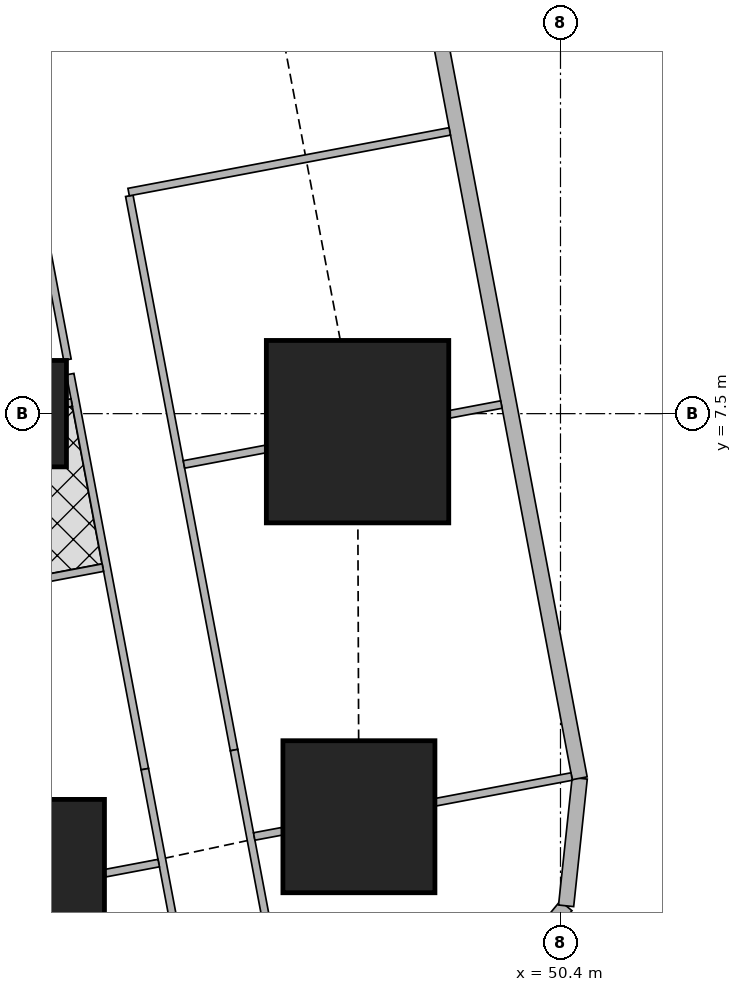
"""IFC4 building model, lengths in metres.
Left out: names, types, materials, properties, quantities, classifications, styles, units other than length and angle.
Written with IfcOpenShell. Run it as: python <this file> out.ifc"""

import sys

from ifc_helpers import new_model, si_unit, direction, frame, frame_2d, origin, origin_2d, place, context, subcontext, project, spatial, rectangle, extrude, element, fill, save


model = new_model("IFC4")
c1 = context("Model", 3, precision=1e-05, world=origin(), true_north=direction((0.0, 1.0)))
c2 = subcontext(c1, "Body", "Model", "MODEL_VIEW")
j1 = project(units=[si_unit("LENGTHUNIT", "METRE"), si_unit("PLANEANGLEUNIT", "RADIAN")], contexts=[c1])
p1 = place(None, origin())
s1 = spatial("IfcSite", under=j1, at=p1, CompositionType="ELEMENT")
p2 = place(p1, origin())
s2 = spatial("IfcBuilding", under=s1, at=p2, CompositionType="ELEMENT")
p3 = place(p2, frame((0.0, 0.0, 216.2)))
s3 = spatial("IfcBuildingStorey", under=s2, at=p3, CompositionType="ELEMENT", Elevation=216.2)
p4 = place(p3, frame((43.2, 1.225, 0.0), z_axis=(0.0, 0.0, 1.0), x_axis=(1.0, 0.0, 0.0)))
e1 = element("IfcColumn", 1, at=p4, inside=s3, PredefinedType="COLUMN", context=c2, shape_type="SweptSolid", body=[
    extrude(rectangle(XDim=2.4, YDim=2.4, at=origin_2d()), origin(), (0.0, 0.0, 1.0), 3.75),
])
p5 = place(p3, frame((47.748, 2.197, 0.0), z_axis=(0.0, 0.0, 1.0), x_axis=(1.0, 0.0, 0.0)))
e2 = element("IfcColumn", 2, at=p5, inside=s3, PredefinedType="COLUMN", context=c2, shape_type="SweptSolid", body=[
    extrude(rectangle(XDim=2.0, YDim=2.0, at=origin_2d()), origin(), (0.0, 0.0, 1.0), 3.75),
])
p6 = place(p3, frame((43.2, 7.5, 0.0), z_axis=(0.0, 0.0, 1.0), x_axis=(1.0, 0.0, 0.0)))
e3 = element("IfcColumn", 3, at=p6, inside=s3, PredefinedType="COLUMN", context=c2, shape_type="SweptSolid", body=[
    extrude(rectangle(XDim=1.4, YDim=1.4, at=origin_2d()), origin(), (0.0, 0.0, 1.0), 3.75),
])
p7 = place(p3, frame((47.73, 7.263, 0.0), z_axis=(0.0, 0.0, 1.0), x_axis=(1.0, 0.0, 0.0)))
e4 = element("IfcColumn", 4, at=p7, inside=s3, PredefinedType="COLUMN", context=c2, shape_type="SweptSolid", body=[
    extrude(rectangle(XDim=2.4, YDim=2.4, at=origin_2d()), origin(), (0.0, 0.0, 1.0), 3.75),
])
p8 = place(p3, frame((49.407, -0.263, 0.0), z_axis=(0.0, 0.0, 1.0), x_axis=(0.638042593423, 0.770001070764, 0.0)))
e5 = element("IfcWall", 5, at=p8, inside=s3, PredefinedType="SOLIDWALL", context=c2, shape_type="SweptSolid", body=[
    extrude(rectangle(XDim=1.673, YDim=0.2, at=frame_2d((0.836, 0.0))), origin(), (0.0, 0.0, 1.0), 3.5),
])
p9 = place(p3, frame((50.474, 1.025, 0.0), z_axis=(0.0, 0.0, 1.0), x_axis=(0.106047815515, 0.994361031429, 0.0)))
e6 = element("IfcWall", 6, at=p9, inside=s3, PredefinedType="SOLIDWALL", context=c2, shape_type="SweptSolid", body=[
    extrude(rectangle(XDim=1.688, YDim=0.2, at=frame_2d((0.844, 0.0))), origin(), (0.0, 0.0, 1.0), 3.5),
])
p10 = place(p3, frame((50.653, 2.703, 0.0), z_axis=(0.0, 0.0, 1.0), x_axis=(-0.185612026696, 0.982623109613, 0.0)))
e7 = element("IfcWall", 7, at=p10, inside=s3, PredefinedType="SOLIDWALL", context=c2, shape_type="SweptSolid", body=[
    extrude(rectangle(XDim=41.393, YDim=0.2, at=frame_2d((20.697, 0.0))), origin(), (0.0, 0.0, 1.0), 3.5),
])
p11 = place(p10, frame((1.633, 0.0, 0.9)))
e8 = element("IfcOpeningElement", 8, at=p11, cuts=e7, PredefinedType="OPENING", context=c2, shape_type="SweptSolid", body=[
    extrude(rectangle(XDim=1.8, YDim=1.5, at=frame_2d((0.9, 0.75))), frame((0.0, 0.11, 0.0), z_axis=(0.0, -1.0, 0.0), x_axis=(1.0, 0.0, 0.0)), (0.0, 0.0, 1.0), 0.22),
])
p12 = place(p10, frame((6.032, 0.0, 0.9)))
e9 = element("IfcOpeningElement", 9, at=p12, cuts=e7, PredefinedType="OPENING", context=c2, shape_type="SweptSolid", body=[
    extrude(rectangle(XDim=1.8, YDim=1.5, at=frame_2d((0.9, 0.75))), frame((0.0, 0.11, 0.0), z_axis=(0.0, -1.0, 0.0), x_axis=(1.0, 0.0, 0.0)), (0.0, 0.0, 1.0), 0.22),
])
p13 = place(p10, frame((9.848, 0.0, 0.9)))
e10 = element("IfcOpeningElement", 10, at=p13, cuts=e7, PredefinedType="OPENING", context=c2, shape_type="SweptSolid", body=[
    extrude(rectangle(XDim=1.8, YDim=1.5, at=frame_2d((0.9, 0.75))), frame((0.0, 0.11, 0.0), z_axis=(0.0, -1.0, 0.0), x_axis=(1.0, 0.0, 0.0)), (0.0, 0.0, 1.0), 0.22),
])
p14 = place(p10, frame((13.664, 0.0, 0.9)))
e11 = element("IfcOpeningElement", 11, at=p14, cuts=e7, PredefinedType="OPENING", context=c2, shape_type="SweptSolid", body=[
    extrude(rectangle(XDim=1.8, YDim=1.5, at=frame_2d((0.9, 0.75))), frame((0.0, 0.11, 0.0), z_axis=(0.0, -1.0, 0.0), x_axis=(1.0, 0.0, 0.0)), (0.0, 0.0, 1.0), 0.22),
])
p15 = place(p10, frame((17.481, 0.0, 0.9)))
e12 = element("IfcOpeningElement", 12, at=p15, cuts=e7, PredefinedType="OPENING", context=c2, shape_type="SweptSolid", body=[
    extrude(rectangle(XDim=1.8, YDim=1.5, at=frame_2d((0.9, 0.75))), frame((0.0, 0.11, 0.0), z_axis=(0.0, -1.0, 0.0), x_axis=(1.0, 0.0, 0.0)), (0.0, 0.0, 1.0), 0.22),
])
p16 = place(p10, frame((21.297, 0.0, 0.9)))
e13 = element("IfcOpeningElement", 13, at=p16, cuts=e7, PredefinedType="OPENING", context=c2, shape_type="SweptSolid", body=[
    extrude(rectangle(XDim=1.8, YDim=1.5, at=frame_2d((0.9, 0.75))), frame((0.0, 0.11, 0.0), z_axis=(0.0, -1.0, 0.0), x_axis=(1.0, 0.0, 0.0)), (0.0, 0.0, 1.0), 0.22),
])
p17 = place(p10, frame((25.113, 0.0, 0.9)))
e14 = element("IfcOpeningElement", 14, at=p17, cuts=e7, PredefinedType="OPENING", context=c2, shape_type="SweptSolid", body=[
    extrude(rectangle(XDim=1.8, YDim=1.5, at=frame_2d((0.9, 0.75))), frame((0.0, 0.11, 0.0), z_axis=(0.0, -1.0, 0.0), x_axis=(1.0, 0.0, 0.0)), (0.0, 0.0, 1.0), 0.22),
])
p18 = place(p10, frame((28.93, 0.0, 0.9)))
e15 = element("IfcOpeningElement", 15, at=p18, cuts=e7, PredefinedType="OPENING", context=c2, shape_type="SweptSolid", body=[
    extrude(rectangle(XDim=1.8, YDim=1.5, at=frame_2d((0.9, 0.75))), frame((0.0, 0.11, 0.0), z_axis=(0.0, -1.0, 0.0), x_axis=(1.0, 0.0, 0.0)), (0.0, 0.0, 1.0), 0.22),
])
p19 = place(p10, frame((32.746, 0.0, 0.9)))
e16 = element("IfcOpeningElement", 16, at=p19, cuts=e7, PredefinedType="OPENING", context=c2, shape_type="SweptSolid", body=[
    extrude(rectangle(XDim=1.8, YDim=1.5, at=frame_2d((0.9, 0.75))), frame((0.0, 0.11, 0.0), z_axis=(0.0, -1.0, 0.0), x_axis=(1.0, 0.0, 0.0)), (0.0, 0.0, 1.0), 0.22),
])
p20 = place(p10, frame((36.481, 0.0, 0.9)))
e17 = element("IfcOpeningElement", 17, at=p20, cuts=e7, PredefinedType="OPENING", context=c2, shape_type="SweptSolid", body=[
    extrude(rectangle(XDim=1.8, YDim=1.5, at=frame_2d((0.9, 0.75))), frame((0.0, 0.11, 0.0), z_axis=(0.0, -1.0, 0.0), x_axis=(1.0, 0.0, 0.0)), (0.0, 0.0, 1.0), 0.22),
])
p21 = place(p3, frame((44.727, 10.366, 0.0), z_axis=(0.0, 0.0, 1.0), x_axis=(0.185678775129, -0.982610498858, 0.0)))
e18 = element("IfcWall", 18, at=p21, inside=s3, PredefinedType="PARTITIONING", context=c2, shape_type="SweptSolid", body=[
    extrude(rectangle(XDim=7.421, YDim=0.1, at=frame_2d((3.71, 0.0))), origin(), (0.0, 0.0, 1.0), 3.5),
])
p22 = place(p21, frame((0.151, 0.0, 0.0)))
e19 = element("IfcOpeningElement", 19, at=p22, cuts=e18, PredefinedType="OPENING", context=c2, shape_type="SweptSolid", body=[
    extrude(rectangle(XDim=0.9, YDim=2.1, at=frame_2d((0.45, 1.05))), frame((0.0, 0.06, 0.0), z_axis=(0.0, -1.0, 0.0), x_axis=(1.0, 0.0, 0.0)), (0.0, 0.0, 1.0), 0.12),
])
p23 = place(p21, frame((4.65, 0.0, 0.0)))
e20 = element("IfcOpeningElement", 20, at=p23, cuts=e18, PredefinedType="OPENING", context=c2, shape_type="SweptSolid", body=[
    extrude(rectangle(XDim=0.9, YDim=2.1, at=frame_2d((0.45, 1.05))), frame((0.0, 0.06, 0.0), z_axis=(0.0, -1.0, 0.0), x_axis=(1.0, 0.0, 0.0)), (0.0, 0.0, 1.0), 0.12),
])
p24 = place(p3, frame((46.105, 3.074, 0.0), z_axis=(0.0, 0.0, 1.0), x_axis=(0.185631845838, -0.982619365681, 0.0)))
e21 = element("IfcWall", 21, at=p24, inside=s3, PredefinedType="PARTITIONING", context=c2, shape_type="SweptSolid", body=[
    extrude(rectangle(XDim=2.403, YDim=0.1, at=frame_2d((1.201, 0.0))), origin(), (0.0, 0.0, 1.0), 2.05),
])
p25 = place(p3, frame((43.539, 10.192, 0.0), z_axis=(0.0, 0.0, 1.0), x_axis=(0.185443145218, -0.982654995353, 0.0)))
e22 = element("IfcWall", 22, at=p25, inside=s3, PredefinedType="PARTITIONING", context=c2, shape_type="SweptSolid", body=[
    extrude(rectangle(XDim=2.017, YDim=0.1, at=frame_2d((1.008, 0.0))), origin(), (0.0, 0.0, 1.0), 3.5),
])
p26 = place(p3, frame((43.949, 8.02, 0.0), z_axis=(0.0, 0.0, 1.0), x_axis=(0.185656792073, -0.982614652627, 0.0)))
e23 = element("IfcWall", 23, at=p26, inside=s3, PredefinedType="PARTITIONING", context=c2, shape_type="SweptSolid", body=[
    extrude(rectangle(XDim=5.289, YDim=0.1, at=frame_2d((2.645, 0.0))), origin(), (0.0, 0.0, 1.0), 3.5),
])
p27 = place(p26, frame((1.2, 0.0, 0.0)))
e24 = element("IfcOpeningElement", 24, at=p27, cuts=e23, PredefinedType="OPENING", context=c2, shape_type="SweptSolid", body=[
    extrude(rectangle(XDim=0.9, YDim=2.1, at=frame_2d((0.45, 1.05))), frame((0.0, 0.06, 0.0), z_axis=(0.0, -1.0, 0.0), x_axis=(1.0, 0.0, 0.0)), (0.0, 0.0, 1.0), 0.12),
])
p28 = place(p26, frame((2.935, 0.0, 0.0)))
e25 = element("IfcOpeningElement", 25, at=p28, cuts=e23, PredefinedType="OPENING", context=c2, shape_type="SweptSolid", body=[
    extrude(rectangle(XDim=0.9, YDim=2.1, at=frame_2d((0.45, 1.05))), frame((0.0, 0.06, 0.0), z_axis=(0.0, -1.0, 0.0), x_axis=(1.0, 0.0, 0.0)), (0.0, 0.0, 1.0), 0.12),
])
p29 = place(p3, frame((44.931, 2.823, 0.0), z_axis=(0.0, 0.0, 1.0), x_axis=(0.185631845838, -0.982619365681, 0.0)))
e26 = element("IfcWall", 26, at=p29, inside=s3, PredefinedType="PARTITIONING", context=c2, shape_type="SweptSolid", body=[
    extrude(rectangle(XDim=2.403, YDim=0.1, at=frame_2d((1.201, 0.0))), origin(), (0.0, 0.0, 1.0), 2.05),
])
p30 = place(p3, frame((48.943, 11.213, 0.0), z_axis=(0.0, 0.0, 1.0), x_axis=(-0.982633535512, -0.185556823879, 0.0)))
e27 = element("IfcWall", 27, at=p30, inside=s3, PredefinedType="PARTITIONING", context=c2, shape_type="SweptSolid", body=[
    extrude(rectangle(XDim=4.3, YDim=0.1, at=frame_2d((2.15, 0.0))), origin(), (0.0, 0.0, 1.0), 2.05),
])
p31 = place(p3, frame((49.622, 7.62, 0.0), z_axis=(0.0, 0.0, 1.0), x_axis=(-0.98254419619, -0.186029305578, 0.0)))
e28 = element("IfcWall", 28, at=p31, inside=s3, PredefinedType="PARTITIONING", context=c2, shape_type="SweptSolid", body=[
    extrude(rectangle(XDim=0.694, YDim=0.1, at=frame_2d((0.347, 0.0))), origin(), (0.0, 0.0, 1.0), 3.5),
])
p32 = place(p3, frame((46.52, 7.035, 0.0), z_axis=(0.0, 0.0, 1.0), x_axis=(-0.982620932907, -0.185623549726, 0.0)))
e29 = element("IfcWall", 29, at=p32, inside=s3, PredefinedType="PARTITIONING", context=c2, shape_type="SweptSolid", body=[
    extrude(rectangle(XDim=1.093, YDim=0.1, at=frame_2d((0.546, 0.0))), origin(), (0.0, 0.0, 1.0), 3.5),
])
p33 = place(p3, frame((50.547, 2.726, 0.0), z_axis=(0.0, 0.0, 1.0), x_axis=(-0.982603988143, -0.185713226471, 0.0)))
e30 = element("IfcWall", 30, at=p33, inside=s3, PredefinedType="PARTITIONING", context=c2, shape_type="SweptSolid", body=[
    extrude(rectangle(XDim=1.821, YDim=0.1, at=frame_2d((0.91, 0.0))), origin(), (0.0, 0.0, 1.0), 2.05),
])
p34 = place(p3, frame((46.738, 2.006, 0.0), z_axis=(0.0, 0.0, 1.0), x_axis=(-0.982820466874, -0.184564161994, 0.0)))
e31 = element("IfcWall", 31, at=p34, inside=s3, PredefinedType="PARTITIONING", context=c2, shape_type="SweptSolid", body=[
    extrude(rectangle(XDim=0.374, YDim=0.1, at=frame_2d((0.187, 0.0))), origin(), (0.0, 0.0, 1.0), 2.05),
])
p35 = place(p3, frame((43.969, 7.646, 0.0), z_axis=(0.0, 0.0, 1.0), x_axis=(-0.983147034646, -0.182816597351, 0.0)))
e32 = element("IfcWall", 32, at=p35, inside=s3, PredefinedType="PARTITIONING", context=c2, shape_type="SweptSolid", body=[
    extrude(rectangle(XDim=0.06, YDim=0.1, at=frame_2d((0.03, 0.0))), origin(), (0.0, 0.0, 1.0), 3.5),
])
p36 = place(p3, frame((45.114, 1.587, 0.0), z_axis=(0.0, 0.0, 1.0), x_axis=(-0.982671022916, -0.185358195723, 0.0)))
e33 = element("IfcWall", 33, at=p36, inside=s3, PredefinedType="PARTITIONING", context=c2, shape_type="SweptSolid", body=[
    extrude(rectangle(XDim=0.717, YDim=0.1, at=frame_2d((0.358, 0.0))), origin(), (0.0, 0.0, 1.0), 2.05),
])
p37 = place(p3, frame((44.379, 5.474, 0.0), z_axis=(0.0, 0.0, 1.0), x_axis=(-0.982607026909, -0.185697147715, 0.0)))
e34 = element("IfcWall", 34, at=p37, inside=s3, PredefinedType="PARTITIONING", context=c2, shape_type="SweptSolid", body=[
    extrude(rectangle(XDim=3.275, YDim=0.1, at=frame_2d((1.637, 0.0))), origin(), (0.0, 0.0, 1.0), 3.5),
])
p38 = place(p11, origin())
e35 = element("IfcWindow", 35, at=p38, inside=s3, PartitioningType="SINGLE_PANEL", PredefinedType="WINDOW", context=c2, shape_type="SweptSolid", body=[
    extrude(rectangle(XDim=1.8, YDim=1.5, at=frame_2d((0.9, 0.75))), frame((0.0, 0.03, 0.0), z_axis=(0.0, -1.0, 0.0), x_axis=(1.0, 0.0, 0.0)), (0.0, 0.0, 1.0), 0.06),
])
fill(e8, e35)
p39 = place(p12, origin())
e36 = element("IfcWindow", 36, at=p39, inside=s3, PartitioningType="SINGLE_PANEL", PredefinedType="WINDOW", context=c2, shape_type="SweptSolid", body=[
    extrude(rectangle(XDim=1.8, YDim=1.5, at=frame_2d((0.9, 0.75))), frame((0.0, 0.03, 0.0), z_axis=(0.0, -1.0, 0.0), x_axis=(1.0, 0.0, 0.0)), (0.0, 0.0, 1.0), 0.06),
])
fill(e9, e36)
p40 = place(p22, origin())
e37 = element("IfcDoor", 37, at=p40, inside=s3, OperationType="SINGLE_SWING_LEFT", PredefinedType="DOOR", context=c2, shape_type="SweptSolid", body=[
    extrude(rectangle(XDim=0.9, YDim=2.1, at=frame_2d((0.45, 1.05))), frame((0.0, 0.025, 0.0), z_axis=(0.0, -1.0, 0.0), x_axis=(1.0, 0.0, 0.0)), (0.0, 0.0, 1.0), 0.05),
])
fill(e19, e37)
p41 = place(p23, origin())
e38 = element("IfcDoor", 38, at=p41, inside=s3, OperationType="SINGLE_SWING_LEFT", PredefinedType="DOOR", context=c2, shape_type="SweptSolid", body=[
    extrude(rectangle(XDim=0.9, YDim=2.1, at=frame_2d((0.45, 1.05))), frame((0.0, 0.025, 0.0), z_axis=(0.0, -1.0, 0.0), x_axis=(1.0, 0.0, 0.0)), (0.0, 0.0, 1.0), 0.05),
])
fill(e20, e38)
p42 = place(p27, origin())
e39 = element("IfcDoor", 39, at=p42, inside=s3, OperationType="SINGLE_SWING_LEFT", PredefinedType="DOOR", context=c2, shape_type="SweptSolid", body=[
    extrude(rectangle(XDim=0.9, YDim=2.1, at=frame_2d((0.45, 1.05))), frame((0.0, 0.025, 0.0), z_axis=(0.0, -1.0, 0.0), x_axis=(1.0, 0.0, 0.0)), (0.0, 0.0, 1.0), 0.05),
])
fill(e24, e39)
p43 = place(p28, origin())
e40 = element("IfcDoor", 40, at=p43, inside=s3, OperationType="SINGLE_SWING_RIGHT", PredefinedType="DOOR", context=c2, shape_type="SweptSolid", body=[
    extrude(rectangle(XDim=0.9, YDim=2.1, at=frame_2d((0.45, 1.05))), frame((0.0, 0.025, 0.0), z_axis=(0.0, -1.0, 0.0), x_axis=(1.0, 0.0, 0.0)), (0.0, 0.0, 1.0), 0.05),
])
fill(e25, e40)
save(model, sys.argv[1])
